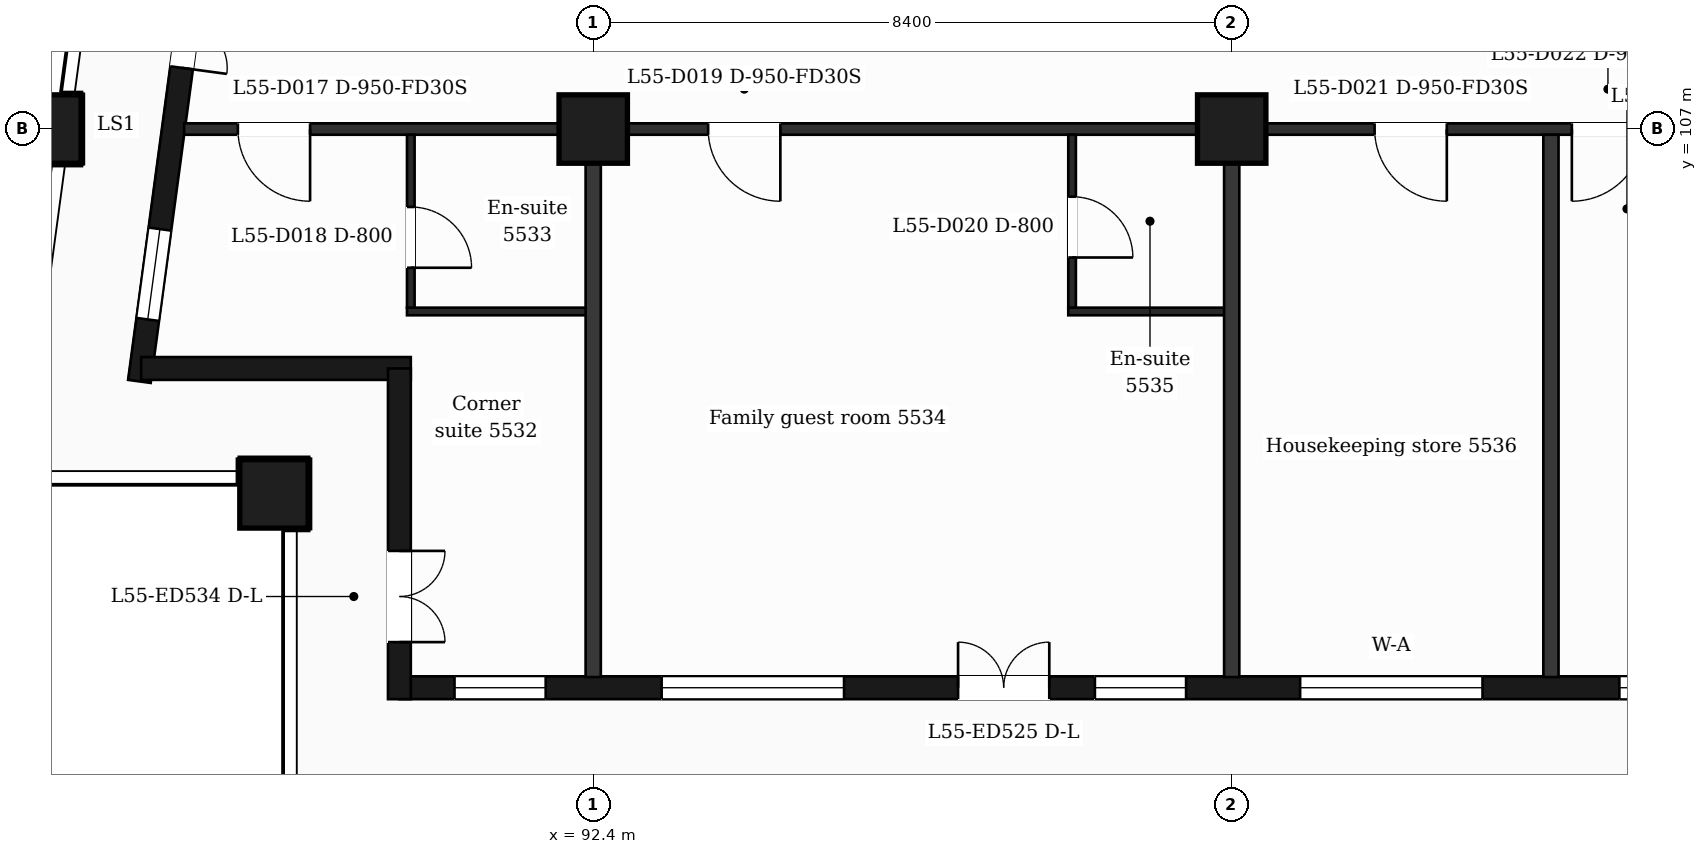
"""IFC4 building model, lengths in metres.
Left out: names, types, materials, properties, quantities, classifications, styles, units other than length and angle.
Written with IfcOpenShell. Run it as: python <this file> out.ifc"""

import sys

from ifc_helpers import new_model, si_unit, direction, frame, frame_2d, origin, origin_2d, place, context, subcontext, project, spatial, rectangle, extrude, element, fill, save


model = new_model("IFC4")
c1 = context("Model", 3, precision=1e-05, world=origin(), true_north=direction((0.0, 1.0)))
c2 = subcontext(c1, "Body", "Model", "MODEL_VIEW")
j1 = project(units=[si_unit("LENGTHUNIT", "METRE"), si_unit("PLANEANGLEUNIT", "RADIAN")], contexts=[c1])
p1 = place(None, origin())
s1 = spatial("IfcSite", under=j1, at=p1, CompositionType="ELEMENT")
p2 = place(p1, origin())
s2 = spatial("IfcBuilding", under=s1, at=p2, CompositionType="ELEMENT")
p3 = place(p2, frame((0.0, 0.0, 228.1)))
s3 = spatial("IfcBuildingStorey", under=s2, at=p3, CompositionType="ELEMENT", Elevation=228.1)
for number, where, z_axis, x_axis in (
    (1, (88.2, 102.2, 0.0), (0.0, 0.0, 1.0), (1.0, 0.0, 0.0)),
    (2, (92.4, 107.0, 0.0), (0.0, 0.0, 1.0), (1.0, 0.0, 0.0)),
    (3, (100.8, 107.0, 0.0), (0.0, 0.0, 1.0), (1.0, 0.0, 0.0)),
    (4, (85.211, 107.0, 0.0), (0.0, 0.0, 1.0), (1.0, 0.0, 0.0)),
):
    element("IfcColumn", number, at=place(p3, frame(where, z_axis=z_axis, x_axis=x_axis)), inside=s3, PredefinedType="COLUMN", context=c2, shape_type="SweptSolid", body=[
        extrude(rectangle(XDim=0.9, YDim=0.9, at=origin_2d()), origin(), (0.0, 0.0, 1.0), 3.7),
    ])
p4 = place(p3, frame((89.85, 99.65, 0.0), z_axis=(0.0, 0.0, 1.0), x_axis=(1.0, 0.0, 0.0)))
e5 = element("IfcWall", 5, at=p4, inside=s3, PredefinedType="SOLIDWALL", context=c2, shape_type="SweptSolid", body=[
    extrude(rectangle(XDim=47.25, YDim=0.3, at=frame_2d((23.625, 0.0))), origin(), (0.0, 0.0, 1.0), 3.38),
])
p5 = place(p4, frame((0.725, 0.0, 0.9)))
e6 = element("IfcOpeningElement", 6, at=p5, cuts=e5, PredefinedType="OPENING", context=c2, shape_type="SweptSolid", body=[
    extrude(rectangle(XDim=1.2, YDim=2.1, at=frame_2d((0.6, 1.05))), frame((0.0, 0.16, 0.0), z_axis=(0.0, -1.0, 0.0), x_axis=(1.0, 0.0, 0.0)), (0.0, 0.0, 1.0), 0.32),
])
p6 = place(p4, frame((3.45, 0.0, 0.9)))
e7 = element("IfcOpeningElement", 7, at=p6, cuts=e5, PredefinedType="OPENING", context=c2, shape_type="SweptSolid", body=[
    extrude(rectangle(XDim=2.4, YDim=2.1, at=frame_2d((1.2, 1.05))), frame((0.0, 0.16, 0.0), z_axis=(0.0, -1.0, 0.0), x_axis=(1.0, 0.0, 0.0)), (0.0, 0.0, 1.0), 0.32),
])
p7 = place(p4, frame((7.35, 0.0, 0.0)))
e8 = element("IfcOpeningElement", 8, at=p7, cuts=e5, PredefinedType="OPENING", context=c2, shape_type="SweptSolid", body=[
    extrude(rectangle(XDim=1.2, YDim=2.4, at=frame_2d((0.6, 1.2))), frame((0.0, 0.16, 0.0), z_axis=(0.0, -1.0, 0.0), x_axis=(1.0, 0.0, 0.0)), (0.0, 0.0, 1.0), 0.32),
])
p8 = place(p4, frame((9.15, 0.0, 0.9)))
e9 = element("IfcOpeningElement", 9, at=p8, cuts=e5, PredefinedType="OPENING", context=c2, shape_type="SweptSolid", body=[
    extrude(rectangle(XDim=1.2, YDim=2.1, at=frame_2d((0.6, 1.05))), frame((0.0, 0.16, 0.0), z_axis=(0.0, -1.0, 0.0), x_axis=(1.0, 0.0, 0.0)), (0.0, 0.0, 1.0), 0.32),
])
p9 = place(p4, frame((11.85, 0.0, 0.9)))
e10 = element("IfcOpeningElement", 10, at=p9, cuts=e5, PredefinedType="OPENING", context=c2, shape_type="SweptSolid", body=[
    extrude(rectangle(XDim=2.4, YDim=2.1, at=frame_2d((1.2, 1.05))), frame((0.0, 0.16, 0.0), z_axis=(0.0, -1.0, 0.0), x_axis=(1.0, 0.0, 0.0)), (0.0, 0.0, 1.0), 0.32),
])
p10 = place(p4, frame((16.05, 0.0, 0.9)))
e11 = element("IfcOpeningElement", 11, at=p10, cuts=e5, PredefinedType="OPENING", context=c2, shape_type="SweptSolid", body=[
    extrude(rectangle(XDim=2.4, YDim=2.1, at=frame_2d((1.2, 1.05))), frame((0.0, 0.16, 0.0), z_axis=(0.0, -1.0, 0.0), x_axis=(1.0, 0.0, 0.0)), (0.0, 0.0, 1.0), 0.32),
])
p11 = place(p4, frame((20.85, 0.0, 0.9)))
e12 = element("IfcOpeningElement", 12, at=p11, cuts=e5, PredefinedType="OPENING", context=c2, shape_type="SweptSolid", body=[
    extrude(rectangle(XDim=1.2, YDim=2.1, at=frame_2d((0.6, 1.05))), frame((0.0, 0.16, 0.0), z_axis=(0.0, -1.0, 0.0), x_axis=(1.0, 0.0, 0.0)), (0.0, 0.0, 1.0), 0.32),
])
p12 = place(p4, frame((25.05, 0.0, 0.9)))
e13 = element("IfcOpeningElement", 13, at=p12, cuts=e5, PredefinedType="OPENING", context=c2, shape_type="SweptSolid", body=[
    extrude(rectangle(XDim=1.2, YDim=2.1, at=frame_2d((0.6, 1.05))), frame((0.0, 0.16, 0.0), z_axis=(0.0, -1.0, 0.0), x_axis=(1.0, 0.0, 0.0)), (0.0, 0.0, 1.0), 0.32),
])
p13 = place(p4, frame((28.65, 0.0, 0.9)))
e14 = element("IfcOpeningElement", 14, at=p13, cuts=e5, PredefinedType="OPENING", context=c2, shape_type="SweptSolid", body=[
    extrude(rectangle(XDim=2.4, YDim=2.1, at=frame_2d((1.2, 1.05))), frame((0.0, 0.16, 0.0), z_axis=(0.0, -1.0, 0.0), x_axis=(1.0, 0.0, 0.0)), (0.0, 0.0, 1.0), 0.32),
])
p14 = place(p4, frame((32.85, 0.0, 0.9)))
e15 = element("IfcOpeningElement", 15, at=p14, cuts=e5, PredefinedType="OPENING", context=c2, shape_type="SweptSolid", body=[
    extrude(rectangle(XDim=2.4, YDim=2.1, at=frame_2d((1.2, 1.05))), frame((0.0, 0.16, 0.0), z_axis=(0.0, -1.0, 0.0), x_axis=(1.0, 0.0, 0.0)), (0.0, 0.0, 1.0), 0.32),
])
p15 = place(p4, frame((37.05, 0.0, 0.9)))
e16 = element("IfcOpeningElement", 16, at=p15, cuts=e5, PredefinedType="OPENING", context=c2, shape_type="SweptSolid", body=[
    extrude(rectangle(XDim=2.4, YDim=2.1, at=frame_2d((1.2, 1.05))), frame((0.0, 0.16, 0.0), z_axis=(0.0, -1.0, 0.0), x_axis=(1.0, 0.0, 0.0)), (0.0, 0.0, 1.0), 0.32),
])
p16 = place(p4, frame((41.25, 0.0, 0.9)))
e17 = element("IfcOpeningElement", 17, at=p16, cuts=e5, PredefinedType="OPENING", context=c2, shape_type="SweptSolid", body=[
    extrude(rectangle(XDim=2.4, YDim=2.1, at=frame_2d((1.2, 1.05))), frame((0.0, 0.16, 0.0), z_axis=(0.0, -1.0, 0.0), x_axis=(1.0, 0.0, 0.0)), (0.0, 0.0, 1.0), 0.32),
])
p17 = place(p4, frame((45.25, 0.0, 0.9)))
e18 = element("IfcOpeningElement", 18, at=p17, cuts=e5, PredefinedType="OPENING", context=c2, shape_type="SweptSolid", body=[
    extrude(rectangle(XDim=1.2, YDim=2.1, at=frame_2d((0.6, 1.05))), frame((0.0, 0.16, 0.0), z_axis=(0.0, -1.0, 0.0), x_axis=(1.0, 0.0, 0.0)), (0.0, 0.0, 1.0), 0.32),
])
p18 = place(p3, frame((87.334, 110.4, 0.0), z_axis=(0.0, 0.0, 1.0), x_axis=(-0.133437175554, -0.991057273915, 0.0)))
e19 = element("IfcWall", 19, at=p18, inside=s3, PredefinedType="SOLIDWALL", context=c2, shape_type="SweptSolid", body=[
    extrude(rectangle(XDim=6.781, YDim=0.3, at=frame_2d((3.39, 0.0))), origin(), (0.0, 0.0, 1.0), 3.38),
])
p19 = place(p18, frame((1.418, 0.0, 0.0)))
e20 = element("IfcOpeningElement", 20, at=p19, cuts=e19, PredefinedType="OPENING", context=c2, shape_type="SweptSolid", body=[
    extrude(rectangle(XDim=1.2, YDim=2.4, at=frame_2d((0.6, 1.2))), frame((0.0, 0.16, 0.0), z_axis=(0.0, -1.0, 0.0), x_axis=(1.0, 0.0, 0.0)), (0.0, 0.0, 1.0), 0.32),
])
p20 = place(p18, frame((4.758, 0.0, 0.9)))
e21 = element("IfcOpeningElement", 21, at=p20, cuts=e19, PredefinedType="OPENING", context=c2, shape_type="SweptSolid", body=[
    extrude(rectangle(XDim=1.2, YDim=2.1, at=frame_2d((0.6, 1.05))), frame((0.0, 0.16, 0.0), z_axis=(0.0, -1.0, 0.0), x_axis=(1.0, 0.0, 0.0)), (0.0, 0.0, 1.0), 0.32),
])
p21 = place(p3, frame((86.452, 103.85, 0.0), z_axis=(0.0, 0.0, 1.0), x_axis=(1.0, 0.0, 0.0)))
e22 = element("IfcWall", 22, at=p21, inside=s3, PredefinedType="SOLIDWALL", context=c2, shape_type="SweptSolid", body=[
    extrude(rectangle(XDim=3.548, YDim=0.3, at=frame_2d((1.774, 0.0))), origin(), (0.0, 0.0, 1.0), 3.38),
])
p22 = place(p3, frame((89.85, 103.85, 0.0), z_axis=(0.0, 0.0, 1.0), x_axis=(0.0, -1.0, 0.0)))
e23 = element("IfcWall", 23, at=p22, inside=s3, PredefinedType="SOLIDWALL", context=c2, shape_type="SweptSolid", body=[
    extrude(rectangle(XDim=4.35, YDim=0.3, at=frame_2d((2.175, 0.0))), origin(), (0.0, 0.0, 1.0), 3.38),
])
p23 = place(p22, frame((2.4, 0.0, 0.0)))
e24 = element("IfcOpeningElement", 24, at=p23, cuts=e23, PredefinedType="OPENING", context=c2, shape_type="SweptSolid", body=[
    extrude(rectangle(XDim=1.2, YDim=2.4, at=frame_2d((0.6, 1.2))), frame((0.0, 0.16, 0.0), z_axis=(0.0, -1.0, 0.0), x_axis=(1.0, 0.0, 0.0)), (0.0, 0.0, 1.0), 0.32),
])
p24 = place(p3, frame((89.95, 104.6, 0.0), z_axis=(0.0, 0.0, 1.0), x_axis=(1.0, 0.0, 0.0)))
e25 = element("IfcWall", 25, at=p24, inside=s3, PredefinedType="PARTITIONING", context=c2, shape_type="SweptSolid", body=[
    extrude(rectangle(XDim=2.45, YDim=0.1, at=frame_2d((1.225, 0.0))), origin(), (0.0, 0.0, 1.0), 3.38),
])
p25 = place(p3, frame((98.65, 104.6, 0.0), z_axis=(0.0, 0.0, 1.0), x_axis=(1.0, 0.0, 0.0)))
e26 = element("IfcWall", 26, at=p25, inside=s3, PredefinedType="PARTITIONING", context=c2, shape_type="SweptSolid", body=[
    extrude(rectangle(XDim=2.15, YDim=0.1, at=frame_2d((1.075, 0.0))), origin(), (0.0, 0.0, 1.0), 3.38),
])
p26 = place(p3, frame((87.018, 107.0, 0.0), z_axis=(0.0, 0.0, 1.0), x_axis=(1.0, 0.0, 0.0)))
e27 = element("IfcWall", 27, at=p26, inside=s3, PredefinedType="PARTITIONING", context=c2, shape_type="SweptSolid", body=[
    extrude(rectangle(XDim=52.765, YDim=0.15, at=frame_2d((26.382, 0.0))), origin(), (0.0, 0.0, 1.0), 3.38),
])
p27 = place(p26, frame((0.707, 0.0, 0.0)))
e28 = element("IfcOpeningElement", 28, at=p27, cuts=e27, PredefinedType="OPENING", context=c2, shape_type="SweptSolid", body=[
    extrude(rectangle(XDim=0.95, YDim=2.1, at=frame_2d((0.475, 1.05))), frame((0.0, 0.085, 0.0), z_axis=(0.0, -1.0, 0.0), x_axis=(1.0, 0.0, 0.0)), (0.0, 0.0, 1.0), 0.17),
])
p28 = place(p26, frame((6.894, 0.0, 0.0)))
e29 = element("IfcOpeningElement", 29, at=p28, cuts=e27, PredefinedType="OPENING", context=c2, shape_type="SweptSolid", body=[
    extrude(rectangle(XDim=0.95, YDim=2.1, at=frame_2d((0.475, 1.05))), frame((0.0, 0.085, 0.0), z_axis=(0.0, -1.0, 0.0), x_axis=(1.0, 0.0, 0.0)), (0.0, 0.0, 1.0), 0.17),
])
p29 = place(p26, frame((15.662, 0.0, 0.0)))
e30 = element("IfcOpeningElement", 30, at=p29, cuts=e27, PredefinedType="OPENING", context=c2, shape_type="SweptSolid", body=[
    extrude(rectangle(XDim=0.95, YDim=2.1, at=frame_2d((0.475, 1.05))), frame((0.0, 0.085, 0.0), z_axis=(0.0, -1.0, 0.0), x_axis=(1.0, 0.0, 0.0)), (0.0, 0.0, 1.0), 0.17),
])
p30 = place(p26, frame((18.257, 0.0, 0.0)))
e31 = element("IfcOpeningElement", 31, at=p30, cuts=e27, PredefinedType="OPENING", context=c2, shape_type="SweptSolid", body=[
    extrude(rectangle(XDim=0.95, YDim=2.1, at=frame_2d((0.475, 1.05))), frame((0.0, 0.085, 0.0), z_axis=(0.0, -1.0, 0.0), x_axis=(1.0, 0.0, 0.0)), (0.0, 0.0, 1.0), 0.17),
])
p31 = place(p26, frame((28.607, 0.0, 0.0)))
e32 = element("IfcOpeningElement", 32, at=p31, cuts=e27, PredefinedType="OPENING", context=c2, shape_type="SweptSolid", body=[
    extrude(rectangle(XDim=1.0, YDim=2.1, at=frame_2d((0.5, 1.05))), frame((0.0, 0.085, 0.0), z_axis=(0.0, -1.0, 0.0), x_axis=(1.0, 0.0, 0.0)), (0.0, 0.0, 1.0), 0.17),
])
p32 = place(p26, frame((31.302, 0.0, 0.0)))
e33 = element("IfcOpeningElement", 33, at=p32, cuts=e27, PredefinedType="OPENING", context=c2, shape_type="SweptSolid", body=[
    extrude(rectangle(XDim=0.95, YDim=2.1, at=frame_2d((0.475, 1.05))), frame((0.0, 0.085, 0.0), z_axis=(0.0, -1.0, 0.0), x_axis=(1.0, 0.0, 0.0)), (0.0, 0.0, 1.0), 0.17),
])
p33 = place(p26, frame((35.057, 0.0, 0.0)))
e34 = element("IfcOpeningElement", 34, at=p33, cuts=e27, PredefinedType="OPENING", context=c2, shape_type="SweptSolid", body=[
    extrude(rectangle(XDim=0.95, YDim=2.1, at=frame_2d((0.475, 1.05))), frame((0.0, 0.085, 0.0), z_axis=(0.0, -1.0, 0.0), x_axis=(1.0, 0.0, 0.0)), (0.0, 0.0, 1.0), 0.17),
])
p34 = place(p26, frame((41.957, 0.0, 0.0)))
e35 = element("IfcOpeningElement", 35, at=p34, cuts=e27, PredefinedType="OPENING", context=c2, shape_type="SweptSolid", body=[
    extrude(rectangle(XDim=0.95, YDim=2.1, at=frame_2d((0.475, 1.05))), frame((0.0, 0.085, 0.0), z_axis=(0.0, -1.0, 0.0), x_axis=(1.0, 0.0, 0.0)), (0.0, 0.0, 1.0), 0.17),
])
p35 = place(p26, frame((45.712, 0.0, 0.0)))
e36 = element("IfcOpeningElement", 36, at=p35, cuts=e27, PredefinedType="OPENING", context=c2, shape_type="SweptSolid", body=[
    extrude(rectangle(XDim=1.0, YDim=2.1, at=frame_2d((0.5, 1.05))), frame((0.0, 0.085, 0.0), z_axis=(0.0, -1.0, 0.0), x_axis=(1.0, 0.0, 0.0)), (0.0, 0.0, 1.0), 0.17),
])
p36 = place(p26, frame((48.974, 0.0, 0.0)))
e37 = element("IfcOpeningElement", 37, at=p36, cuts=e27, PredefinedType="OPENING", context=c2, shape_type="SweptSolid", body=[
    extrude(rectangle(XDim=0.95, YDim=2.1, at=frame_2d((0.475, 1.05))), frame((0.0, 0.085, 0.0), z_axis=(0.0, -1.0, 0.0), x_axis=(1.0, 0.0, 0.0)), (0.0, 0.0, 1.0), 0.17),
])
p37 = place(p3, frame((90.0, 104.65, 0.0), z_axis=(0.0, 0.0, 1.0), x_axis=(0.0, 1.0, 0.0)))
e38 = element("IfcWall", 38, at=p37, inside=s3, PredefinedType="PARTITIONING", context=c2, shape_type="SweptSolid", body=[
    extrude(rectangle(XDim=2.275, YDim=0.1, at=frame_2d((1.138, 0.0))), origin(), (0.0, 0.0, 1.0), 3.38),
])
p38 = place(p37, frame((0.525, 0.0, 0.0)))
e39 = element("IfcOpeningElement", 39, at=p38, cuts=e38, PredefinedType="OPENING", context=c2, shape_type="SweptSolid", body=[
    extrude(rectangle(XDim=0.8, YDim=2.1, at=frame_2d((0.4, 1.05))), frame((0.0, 0.06, 0.0), z_axis=(0.0, -1.0, 0.0), x_axis=(1.0, 0.0, 0.0)), (0.0, 0.0, 1.0), 0.12),
])
p39 = place(p3, frame((92.4, 99.79, 0.0), z_axis=(0.0, 0.0, 1.0), x_axis=(0.0, 1.0, 0.0)))
e40 = element("IfcWall", 40, at=p39, inside=s3, PredefinedType="PARTITIONING", context=c2, shape_type="SweptSolid", body=[
    extrude(rectangle(XDim=7.135, YDim=0.2, at=frame_2d((3.567, 0.0))), origin(), (0.0, 0.0, 1.0), 3.38),
])
p40 = place(p3, frame((98.7, 104.65, 0.0), z_axis=(0.0, 0.0, 1.0), x_axis=(0.0, 1.0, 0.0)))
e41 = element("IfcWall", 41, at=p40, inside=s3, PredefinedType="PARTITIONING", context=c2, shape_type="SweptSolid", body=[
    extrude(rectangle(XDim=2.275, YDim=0.1, at=frame_2d((1.138, 0.0))), origin(), (0.0, 0.0, 1.0), 3.38),
])
p41 = place(p40, frame((0.66, 0.0, 0.0)))
e42 = element("IfcOpeningElement", 42, at=p41, cuts=e41, PredefinedType="OPENING", context=c2, shape_type="SweptSolid", body=[
    extrude(rectangle(XDim=0.8, YDim=2.1, at=frame_2d((0.4, 1.05))), frame((0.0, 0.06, 0.0), z_axis=(0.0, -1.0, 0.0), x_axis=(1.0, 0.0, 0.0)), (0.0, 0.0, 1.0), 0.12),
])
for number, where, z_axis, x_axis in (
    (43, (100.8, 99.79, 0.0), (0.0, 0.0, 1.0), (0.0, 1.0, 0.0)),
    (44, (105.0, 99.79, 0.0), (0.0, 0.0, 1.0), (0.0, 1.0, 0.0)),
):
    element("IfcWall", number, at=place(p3, frame(where, z_axis=z_axis, x_axis=x_axis)), inside=s3, PredefinedType="PARTITIONING", context=c2, shape_type="SweptSolid", body=[
        extrude(rectangle(XDim=7.135, YDim=0.2, at=frame_2d((3.567, 0.0))), origin(), (0.0, 0.0, 1.0), 3.38),
    ])
p42 = place(p5, origin())
e45 = element("IfcWindow", 45, at=p42, inside=s3, PartitioningType="SINGLE_PANEL", PredefinedType="WINDOW", context=c2, shape_type="SweptSolid", body=[
    extrude(rectangle(XDim=1.2, YDim=2.1, at=frame_2d((0.6, 1.05))), frame((0.0, 0.03, 0.0), z_axis=(0.0, -1.0, 0.0), x_axis=(1.0, 0.0, 0.0)), (0.0, 0.0, 1.0), 0.06),
])
fill(e6, e45)
p43 = place(p6, origin())
e46 = element("IfcWindow", 46, at=p43, inside=s3, PartitioningType="SINGLE_PANEL", PredefinedType="WINDOW", context=c2, shape_type="SweptSolid", body=[
    extrude(rectangle(XDim=2.4, YDim=2.1, at=frame_2d((1.2, 1.05))), frame((0.0, 0.03, 0.0), z_axis=(0.0, -1.0, 0.0), x_axis=(1.0, 0.0, 0.0)), (0.0, 0.0, 1.0), 0.06),
])
fill(e7, e46)
p44 = place(p7, origin())
e47 = element("IfcDoor", 47, at=p44, inside=s3, OperationType="DOUBLE_DOOR_SINGLE_SWING", PredefinedType="DOOR", context=c2, shape_type="SweptSolid", body=[
    extrude(rectangle(XDim=1.2, YDim=2.4, at=frame_2d((0.6, 1.2))), frame((0.0, 0.025, 0.0), z_axis=(0.0, -1.0, 0.0), x_axis=(1.0, 0.0, 0.0)), (0.0, 0.0, 1.0), 0.05),
])
fill(e8, e47)
p45 = place(p8, origin())
e48 = element("IfcWindow", 48, at=p45, inside=s3, PartitioningType="SINGLE_PANEL", PredefinedType="WINDOW", context=c2, shape_type="SweptSolid", body=[
    extrude(rectangle(XDim=1.2, YDim=2.1, at=frame_2d((0.6, 1.05))), frame((0.0, 0.03, 0.0), z_axis=(0.0, -1.0, 0.0), x_axis=(1.0, 0.0, 0.0)), (0.0, 0.0, 1.0), 0.06),
])
fill(e9, e48)
p46 = place(p9, origin())
e49 = element("IfcWindow", 49, at=p46, inside=s3, PartitioningType="SINGLE_PANEL", PredefinedType="WINDOW", context=c2, shape_type="SweptSolid", body=[
    extrude(rectangle(XDim=2.4, YDim=2.1, at=frame_2d((1.2, 1.05))), frame((0.0, 0.03, 0.0), z_axis=(0.0, -1.0, 0.0), x_axis=(1.0, 0.0, 0.0)), (0.0, 0.0, 1.0), 0.06),
])
fill(e10, e49)
p47 = place(p10, origin())
e50 = element("IfcWindow", 50, at=p47, inside=s3, PartitioningType="SINGLE_PANEL", PredefinedType="WINDOW", context=c2, shape_type="SweptSolid", body=[
    extrude(rectangle(XDim=2.4, YDim=2.1, at=frame_2d((1.2, 1.05))), frame((0.0, 0.03, 0.0), z_axis=(0.0, -1.0, 0.0), x_axis=(1.0, 0.0, 0.0)), (0.0, 0.0, 1.0), 0.06),
])
fill(e11, e50)
p48 = place(p19, origin())
e51 = element("IfcDoor", 51, at=p48, inside=s3, OperationType="DOUBLE_DOOR_SINGLE_SWING", PredefinedType="DOOR", context=c2, shape_type="SweptSolid", body=[
    extrude(rectangle(XDim=1.2, YDim=2.4, at=frame_2d((0.6, 1.2))), frame((0.0, 0.025, 0.0), z_axis=(0.0, -1.0, 0.0), x_axis=(1.0, 0.0, 0.0)), (0.0, 0.0, 1.0), 0.05),
])
fill(e20, e51)
p49 = place(p20, origin())
e52 = element("IfcWindow", 52, at=p49, inside=s3, PartitioningType="SINGLE_PANEL", PredefinedType="WINDOW", context=c2, shape_type="SweptSolid", body=[
    extrude(rectangle(XDim=1.2, YDim=2.1, at=frame_2d((0.6, 1.05))), frame((0.0, 0.03, 0.0), z_axis=(0.0, -1.0, 0.0), x_axis=(1.0, 0.0, 0.0)), (0.0, 0.0, 1.0), 0.06),
])
fill(e21, e52)
p50 = place(p23, origin())
e53 = element("IfcDoor", 53, at=p50, inside=s3, OperationType="DOUBLE_DOOR_SINGLE_SWING", PredefinedType="DOOR", context=c2, shape_type="SweptSolid", body=[
    extrude(rectangle(XDim=1.2, YDim=2.4, at=frame_2d((0.6, 1.2))), frame((0.0, 0.025, 0.0), z_axis=(0.0, -1.0, 0.0), x_axis=(1.0, 0.0, 0.0)), (0.0, 0.0, 1.0), 0.05),
])
fill(e24, e53)
p51 = place(p27, origin())
e54 = element("IfcDoor", 54, at=p51, inside=s3, OperationType="SINGLE_SWING_RIGHT", PredefinedType="DOOR", context=c2, shape_type="SweptSolid", body=[
    extrude(rectangle(XDim=0.95, YDim=2.1, at=frame_2d((0.475, 1.05))), frame((0.0, 0.025, 0.0), z_axis=(0.0, -1.0, 0.0), x_axis=(1.0, 0.0, 0.0)), (0.0, 0.0, 1.0), 0.05),
])
fill(e28, e54)
p52 = place(p38, origin())
e55 = element("IfcDoor", 55, at=p52, inside=s3, OperationType="SINGLE_SWING_LEFT", PredefinedType="DOOR", context=c2, shape_type="SweptSolid", body=[
    extrude(rectangle(XDim=0.8, YDim=2.1, at=frame_2d((0.4, 1.05))), frame((0.0, 0.025, 0.0), z_axis=(0.0, -1.0, 0.0), x_axis=(1.0, 0.0, 0.0)), (0.0, 0.0, 1.0), 0.05),
])
fill(e39, e55)
p53 = place(p28, origin())
e56 = element("IfcDoor", 56, at=p53, inside=s3, OperationType="SINGLE_SWING_RIGHT", PredefinedType="DOOR", context=c2, shape_type="SweptSolid", body=[
    extrude(rectangle(XDim=0.95, YDim=2.1, at=frame_2d((0.475, 1.05))), frame((0.0, 0.025, 0.0), z_axis=(0.0, -1.0, 0.0), x_axis=(1.0, 0.0, 0.0)), (0.0, 0.0, 1.0), 0.05),
])
fill(e29, e56)
p54 = place(p41, origin())
e57 = element("IfcDoor", 57, at=p54, inside=s3, OperationType="SINGLE_SWING_LEFT", PredefinedType="DOOR", context=c2, shape_type="SweptSolid", body=[
    extrude(rectangle(XDim=0.8, YDim=2.1, at=frame_2d((0.4, 1.05))), frame((0.0, 0.025, 0.0), z_axis=(0.0, -1.0, 0.0), x_axis=(1.0, 0.0, 0.0)), (0.0, 0.0, 1.0), 0.05),
])
fill(e42, e57)
p55 = place(p29, origin())
e58 = element("IfcDoor", 58, at=p55, inside=s3, OperationType="SINGLE_SWING_RIGHT", PredefinedType="DOOR", context=c2, shape_type="SweptSolid", body=[
    extrude(rectangle(XDim=0.95, YDim=2.1, at=frame_2d((0.475, 1.05))), frame((0.0, 0.025, 0.0), z_axis=(0.0, -1.0, 0.0), x_axis=(1.0, 0.0, 0.0)), (0.0, 0.0, 1.0), 0.05),
])
fill(e30, e58)
p56 = place(p30, origin())
e59 = element("IfcDoor", 59, at=p56, inside=s3, OperationType="SINGLE_SWING_LEFT", PredefinedType="DOOR", context=c2, shape_type="SweptSolid", body=[
    extrude(rectangle(XDim=0.95, YDim=2.1, at=frame_2d((0.475, 1.05))), frame((0.0, 0.025, 0.0), z_axis=(0.0, -1.0, 0.0), x_axis=(1.0, 0.0, 0.0)), (0.0, 0.0, 1.0), 0.05),
])
fill(e31, e59)
save(model, sys.argv[1])
